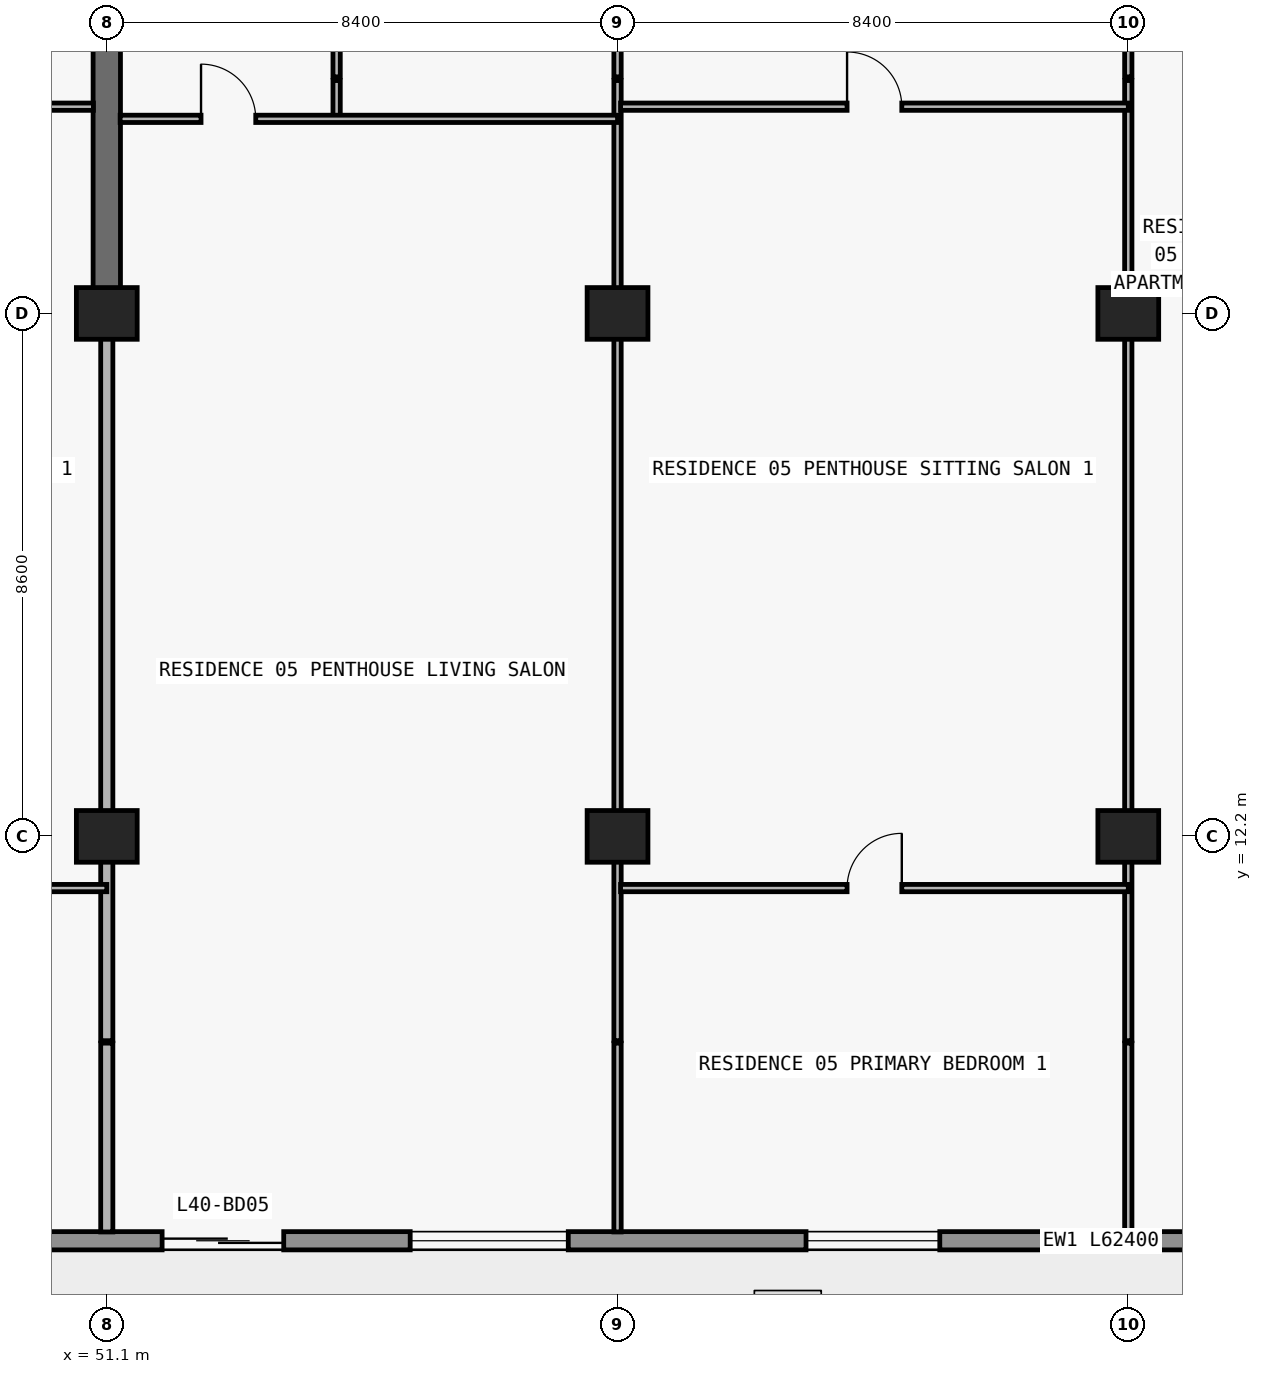
"""IFC4 building model, lengths in metres.
Left out: names, types, materials, properties, quantities, classifications, styles, units other than length and angle.
Written with IfcOpenShell. Run it as: python <this file> out.ifc"""

import sys

from ifc_helpers import new_model, si_unit, direction, frame, frame_2d, origin, origin_2d, place, context, subcontext, project, spatial, rectangle, extrude, element, fill, save


model = new_model("IFC4")
c1 = context("Model", 3, precision=1e-05, world=origin(), true_north=direction((0.0, 1.0)))
c2 = subcontext(c1, "Body", "Model", "MODEL_VIEW")
j1 = project(units=[si_unit("LENGTHUNIT", "METRE"), si_unit("PLANEANGLEUNIT", "RADIAN")], contexts=[c1])
p1 = place(None, origin())
s1 = spatial("IfcSite", under=j1, at=p1, CompositionType="ELEMENT")
p2 = place(p1, origin())
s2 = spatial("IfcBuilding", under=s1, at=p2, CompositionType="ELEMENT")
p3 = place(p2, frame((0.0, 0.0, 145.5)))
s3 = spatial("IfcBuildingStorey", under=s2, at=p3, CompositionType="ELEMENT", Elevation=145.5)
for number, where, z_axis, x_axis in (
    (1, (51.1, 12.2, 0.0), (0.0, 0.0, 1.0), (1.0, 0.0, 0.0)),
    (2, (59.5, 12.2, 0.0), (0.0, 0.0, 1.0), (1.0, 0.0, 0.0)),
    (3, (67.9, 12.2, 0.0), (0.0, 0.0, 1.0), (1.0, 0.0, 0.0)),
    (4, (51.1, 20.8, 0.0), (0.0, 0.0, 1.0), (1.0, 0.0, 0.0)),
    (5, (59.5, 20.8, 0.0), (0.0, 0.0, 1.0), (1.0, 0.0, 0.0)),
    (6, (67.9, 20.8, 0.0), (0.0, 0.0, 1.0), (1.0, 0.0, 0.0)),
):
    element("IfcColumn", number, at=place(p3, frame(where, z_axis=z_axis, x_axis=x_axis)), inside=s3, PredefinedType="COLUMN", context=c2, shape_type="SweptSolid", body=[
        extrude(rectangle(XDim=1.0, YDim=0.85, at=origin_2d()), origin(), (0.0, 0.0, 1.0), 3.05),
    ])
p4 = place(p3, frame((51.1, 20.8, 0.0), z_axis=(0.0, 0.0, 1.0), x_axis=(0.0, 1.0, 0.0)))
e7 = element("IfcWall", 7, at=p4, inside=s3, PredefinedType="SHEAR", context=c2, shape_type="SweptSolid", body=[
    extrude(rectangle(XDim=8.6, YDim=0.45, at=frame_2d((4.3, 0.0))), origin(), (0.0, 0.0, 1.0), 3.05),
])
p5 = place(p3, frame((70.1, 5.55, 0.0), z_axis=(0.0, 0.0, 1.0), x_axis=(-1.0, 0.0, 0.0)))
e8 = element("IfcWall", 8, at=p5, inside=s3, PredefinedType="STANDARD", context=c2, shape_type="SweptSolid", body=[
    extrude(rectangle(XDim=62.4, YDim=0.3, at=frame_2d((31.2, 0.0))), origin(), (0.0, 0.0, 1.0), 3.05),
])
p6 = place(p5, frame((57.226, 0.0, 0.0)))
e9 = element("IfcOpeningElement", 9, at=p6, cuts=e8, PredefinedType="OPENING", context=c2, shape_type="SweptSolid", body=[
    extrude(rectangle(XDim=2.0, YDim=2.3, at=frame_2d((1.0, 1.15))), frame((0.0, 0.16, 0.0), z_axis=(0.0, -1.0, 0.0), x_axis=(1.0, 0.0, 0.0)), (0.0, 0.0, 1.0), 0.32),
])
p7 = place(p5, frame((52.926, 0.0, 0.85)))
e10 = element("IfcOpeningElement", 10, at=p7, cuts=e8, PredefinedType="OPENING", context=c2, shape_type="SweptSolid", body=[
    extrude(rectangle(XDim=2.2, YDim=1.55, at=frame_2d((1.1, 0.775))), frame((0.0, 0.16, 0.0), z_axis=(0.0, -1.0, 0.0), x_axis=(1.0, 0.0, 0.0)), (0.0, 0.0, 1.0), 0.32),
])
p8 = place(p5, frame((48.49, 0.0, 0.0)))
e11 = element("IfcOpeningElement", 11, at=p8, cuts=e8, PredefinedType="OPENING", context=c2, shape_type="SweptSolid", body=[
    extrude(rectangle(XDim=2.0, YDim=2.3, at=frame_2d((1.0, 1.15))), frame((0.0, 0.16, 0.0), z_axis=(0.0, -1.0, 0.0), x_axis=(1.0, 0.0, 0.0)), (0.0, 0.0, 1.0), 0.32),
])
p9 = place(p5, frame((44.39, 0.0, 0.85)))
e12 = element("IfcOpeningElement", 12, at=p9, cuts=e8, PredefinedType="OPENING", context=c2, shape_type="SweptSolid", body=[
    extrude(rectangle(XDim=1.8, YDim=1.55, at=frame_2d((0.9, 0.775))), frame((0.0, 0.16, 0.0), z_axis=(0.0, -1.0, 0.0), x_axis=(1.0, 0.0, 0.0)), (0.0, 0.0, 1.0), 0.32),
])
p10 = place(p5, frame((40.426, 0.0, 0.0)))
e13 = element("IfcOpeningElement", 13, at=p10, cuts=e8, PredefinedType="OPENING", context=c2, shape_type="SweptSolid", body=[
    extrude(rectangle(XDim=2.0, YDim=2.3, at=frame_2d((1.0, 1.15))), frame((0.0, 0.16, 0.0), z_axis=(0.0, -1.0, 0.0), x_axis=(1.0, 0.0, 0.0)), (0.0, 0.0, 1.0), 0.32),
])
p11 = place(p5, frame((36.126, 0.0, 0.85)))
e14 = element("IfcOpeningElement", 14, at=p11, cuts=e8, PredefinedType="OPENING", context=c2, shape_type="SweptSolid", body=[
    extrude(rectangle(XDim=2.2, YDim=1.55, at=frame_2d((1.1, 0.775))), frame((0.0, 0.16, 0.0), z_axis=(0.0, -1.0, 0.0), x_axis=(1.0, 0.0, 0.0)), (0.0, 0.0, 1.0), 0.32),
])
p12 = place(p5, frame((32.09, 0.0, 0.0)))
e15 = element("IfcOpeningElement", 15, at=p12, cuts=e8, PredefinedType="OPENING", context=c2, shape_type="SweptSolid", body=[
    extrude(rectangle(XDim=2.0, YDim=2.3, at=frame_2d((1.0, 1.15))), frame((0.0, 0.16, 0.0), z_axis=(0.0, -1.0, 0.0), x_axis=(1.0, 0.0, 0.0)), (0.0, 0.0, 1.0), 0.32),
])
p13 = place(p5, frame((28.21, 0.0, 0.65)))
e16 = element("IfcOpeningElement", 16, at=p13, cuts=e8, PredefinedType="OPENING", context=c2, shape_type="SweptSolid", body=[
    extrude(rectangle(XDim=2.6, YDim=1.85, at=frame_2d((1.3, 0.925))), frame((0.0, 0.16, 0.0), z_axis=(0.0, -1.0, 0.0), x_axis=(1.0, 0.0, 0.0)), (0.0, 0.0, 1.0), 0.32),
])
p14 = place(p5, frame((22.1, 0.0, 0.85)))
e17 = element("IfcOpeningElement", 17, at=p14, cuts=e8, PredefinedType="OPENING", context=c2, shape_type="SweptSolid", body=[
    extrude(rectangle(XDim=2.2, YDim=1.55, at=frame_2d((1.1, 0.775))), frame((0.0, 0.16, 0.0), z_axis=(0.0, -1.0, 0.0), x_axis=(1.0, 0.0, 0.0)), (0.0, 0.0, 1.0), 0.32),
])
p15 = place(p5, frame((16.09, 0.0, 0.0)))
e18 = element("IfcOpeningElement", 18, at=p15, cuts=e8, PredefinedType="OPENING", context=c2, shape_type="SweptSolid", body=[
    extrude(rectangle(XDim=2.0, YDim=2.3, at=frame_2d((1.0, 1.15))), frame((0.0, 0.16, 0.0), z_axis=(0.0, -1.0, 0.0), x_axis=(1.0, 0.0, 0.0)), (0.0, 0.0, 1.0), 0.32),
])
p16 = place(p5, frame((11.41, 0.0, 0.65)))
e19 = element("IfcOpeningElement", 19, at=p16, cuts=e8, PredefinedType="OPENING", context=c2, shape_type="SweptSolid", body=[
    extrude(rectangle(XDim=2.6, YDim=1.85, at=frame_2d((1.3, 0.925))), frame((0.0, 0.16, 0.0), z_axis=(0.0, -1.0, 0.0), x_axis=(1.0, 0.0, 0.0)), (0.0, 0.0, 1.0), 0.32),
])
p17 = place(p5, frame((5.3, 0.0, 0.85)))
e20 = element("IfcOpeningElement", 20, at=p17, cuts=e8, PredefinedType="OPENING", context=c2, shape_type="SweptSolid", body=[
    extrude(rectangle(XDim=2.2, YDim=1.55, at=frame_2d((1.1, 0.775))), frame((0.0, 0.16, 0.0), z_axis=(0.0, -1.0, 0.0), x_axis=(1.0, 0.0, 0.0)), (0.0, 0.0, 1.0), 0.32),
])
p18 = place(p3, frame((51.1, 5.695, 0.0), z_axis=(0.0, 0.0, 1.0), x_axis=(0.0, 1.0, 0.0)))
e21 = element("IfcWall", 21, at=p18, inside=s3, PredefinedType="PARTITIONING", context=c2, shape_type="SweptSolid", body=[
    extrude(rectangle(XDim=3.105, YDim=0.2, at=frame_2d((1.552, 0.0))), origin(), (0.0, 0.0, 1.0), 3.05),
])
p19 = place(p3, frame((51.1, 8.84, 0.0), z_axis=(0.0, 0.0, 1.0), x_axis=(0.0, 1.0, 0.0)))
e22 = element("IfcWall", 22, at=p19, inside=s3, PredefinedType="PARTITIONING", context=c2, shape_type="SweptSolid", body=[
    extrude(rectangle(XDim=11.955, YDim=0.2, at=frame_2d((5.978, 0.0))), origin(), (0.0, 0.0, 1.0), 2.174),
])
p20 = place(p3, frame((54.88, 24.0, 0.0), z_axis=(0.0, 0.0, 1.0), x_axis=(0.0, 1.0, 0.0)))
e23 = element("IfcWall", 23, at=p20, inside=s3, PredefinedType="PARTITIONING", context=c2, shape_type="SweptSolid", body=[
    extrude(rectangle(XDim=0.63, YDim=0.12, at=frame_2d((0.315, 0.0))), origin(), (0.0, 0.0, 1.0), 3.05),
])
p21 = place(p3, frame((54.88, 24.69, 0.0), z_axis=(0.0, 0.0, 1.0), x_axis=(0.0, 1.0, 0.0)))
e24 = element("IfcWall", 24, at=p21, inside=s3, PredefinedType="PARTITIONING", context=c2, shape_type="SweptSolid", body=[
    extrude(rectangle(XDim=4.11, YDim=0.12, at=frame_2d((2.055, 0.0))), origin(), (0.0, 0.0, 1.0), 3.05),
])
p22 = place(p21, frame((1.605, 0.0, 0.0)))
e25 = element("IfcOpeningElement", 25, at=p22, cuts=e24, PredefinedType="OPENING", context=c2, shape_type="SweptSolid", body=[
    extrude(rectangle(XDim=0.9, YDim=2.15, at=frame_2d((0.45, 1.075))), frame((0.0, 0.07, 0.0), z_axis=(0.0, -1.0, 0.0), x_axis=(1.0, 0.0, 0.0)), (0.0, 0.0, 1.0), 0.14),
])
p23 = place(p3, frame((59.5, 5.695, 0.0), z_axis=(0.0, 0.0, 1.0), x_axis=(0.0, 1.0, 0.0)))
e26 = element("IfcWall", 26, at=p23, inside=s3, PredefinedType="PARTITIONING", context=c2, shape_type="SweptSolid", body=[
    extrude(rectangle(XDim=3.105, YDim=0.12, at=frame_2d((1.552, 0.0))), origin(), (0.0, 0.0, 1.0), 3.05),
])
p24 = place(p3, frame((59.5, 8.84, 0.0), z_axis=(0.0, 0.0, 1.0), x_axis=(0.0, 1.0, 0.0)))
e27 = element("IfcWall", 27, at=p24, inside=s3, PredefinedType="PARTITIONING", context=c2, shape_type="SweptSolid", body=[
    extrude(rectangle(XDim=15.79, YDim=0.12, at=frame_2d((7.895, 0.0))), origin(), (0.0, 0.0, 1.0), 2.174),
])
p25 = place(p3, frame((59.5, 24.69, 0.0), z_axis=(0.0, 0.0, 1.0), x_axis=(0.0, 1.0, 0.0)))
e28 = element("IfcWall", 28, at=p25, inside=s3, PredefinedType="PARTITIONING", context=c2, shape_type="SweptSolid", body=[
    extrude(rectangle(XDim=5.09, YDim=0.12, at=frame_2d((2.545, 0.0))), origin(), (0.0, 0.0, 1.0), 2.174),
])
p26 = place(p25, frame((1.505, 0.0, 0.0)))
e29 = element("IfcOpeningElement", 29, at=p26, cuts=e28, PredefinedType="OPENING", context=c2, shape_type="SweptSolid", body=[
    extrude(rectangle(XDim=0.9, YDim=2.124, at=frame_2d((0.45, 1.062))), frame((0.0, 0.07, 0.0), z_axis=(0.0, -1.0, 0.0), x_axis=(1.0, 0.0, 0.0)), (0.0, 0.0, 1.0), 0.14),
])
p27 = place(p3, frame((67.9, 5.695, 0.0), z_axis=(0.0, 0.0, 1.0), x_axis=(0.0, 1.0, 0.0)))
e30 = element("IfcWall", 30, at=p27, inside=s3, PredefinedType="PARTITIONING", context=c2, shape_type="SweptSolid", body=[
    extrude(rectangle(XDim=3.105, YDim=0.12, at=frame_2d((1.552, 0.0))), origin(), (0.0, 0.0, 1.0), 3.05),
])
p28 = place(p3, frame((67.9, 8.84, 0.0), z_axis=(0.0, 0.0, 1.0), x_axis=(0.0, 1.0, 0.0)))
e31 = element("IfcWall", 31, at=p28, inside=s3, PredefinedType="PARTITIONING", context=c2, shape_type="SweptSolid", body=[
    extrude(rectangle(XDim=15.79, YDim=0.12, at=frame_2d((7.895, 0.0))), origin(), (0.0, 0.0, 1.0), 2.174),
])
p29 = place(p3, frame((67.9, 24.69, 0.0), z_axis=(0.0, 0.0, 1.0), x_axis=(0.0, 1.0, 0.0)))
e32 = element("IfcWall", 32, at=p29, inside=s3, PredefinedType="PARTITIONING", context=c2, shape_type="SweptSolid", body=[
    extrude(rectangle(XDim=5.09, YDim=0.12, at=frame_2d((2.545, 0.0))), origin(), (0.0, 0.0, 1.0), 2.174),
])
p30 = place(p29, frame((1.505, 0.0, 0.0)))
e33 = element("IfcOpeningElement", 33, at=p30, cuts=e32, PredefinedType="OPENING", context=c2, shape_type="SweptSolid", body=[
    extrude(rectangle(XDim=0.9, YDim=2.124, at=frame_2d((0.45, 1.062))), frame((0.0, 0.07, 0.0), z_axis=(0.0, -1.0, 0.0), x_axis=(1.0, 0.0, 0.0)), (0.0, 0.0, 1.0), 0.14),
])
p31 = place(p3, frame((42.7, 11.35, 0.0), z_axis=(0.0, 0.0, 1.0), x_axis=(1.0, 0.0, 0.0)))
e34 = element("IfcWall", 34, at=p31, inside=s3, PredefinedType="PARTITIONING", context=c2, shape_type="SweptSolid", body=[
    extrude(rectangle(XDim=8.4, YDim=0.12, at=frame_2d((4.2, 0.0))), origin(), (0.0, 0.0, 1.0), 3.05),
])
p32 = place(p31, frame((3.75, 0.0, 0.0)))
e35 = element("IfcOpeningElement", 35, at=p32, cuts=e34, PredefinedType="OPENING", context=c2, shape_type="SweptSolid", body=[
    extrude(rectangle(XDim=0.9, YDim=2.15, at=frame_2d((0.45, 1.075))), frame((0.0, 0.07, 0.0), z_axis=(0.0, -1.0, 0.0), x_axis=(1.0, 0.0, 0.0)), (0.0, 0.0, 1.0), 0.14),
])
p33 = place(p3, frame((59.55, 11.35, 0.0), z_axis=(0.0, 0.0, 1.0), x_axis=(1.0, 0.0, 0.0)))
e36 = element("IfcWall", 36, at=p33, inside=s3, PredefinedType="PARTITIONING", context=c2, shape_type="SweptSolid", body=[
    extrude(rectangle(XDim=8.35, YDim=0.12, at=frame_2d((4.175, 0.0))), origin(), (0.0, 0.0, 1.0), 3.05),
])
p34 = place(p33, frame((3.725, 0.0, 0.0)))
e37 = element("IfcOpeningElement", 37, at=p34, cuts=e36, PredefinedType="OPENING", context=c2, shape_type="SweptSolid", body=[
    extrude(rectangle(XDim=0.9, YDim=2.15, at=frame_2d((0.45, 1.075))), frame((0.0, 0.07, 0.0), z_axis=(0.0, -1.0, 0.0), x_axis=(1.0, 0.0, 0.0)), (0.0, 0.0, 1.0), 0.14),
])
p35 = place(p3, frame((51.32, 24.0, 0.0), z_axis=(0.0, 0.0, 1.0), x_axis=(1.0, 0.0, 0.0)))
e38 = element("IfcWall", 38, at=p35, inside=s3, PredefinedType="PARTITIONING", context=c2, shape_type="SweptSolid", body=[
    extrude(rectangle(XDim=8.18, YDim=0.12, at=frame_2d((4.09, 0.0))), origin(), (0.0, 0.0, 1.0), 3.05),
])
p36 = place(p35, frame((1.33, 0.0, 0.0)))
e39 = element("IfcOpeningElement", 39, at=p36, cuts=e38, PredefinedType="OPENING", context=c2, shape_type="SweptSolid", body=[
    extrude(rectangle(XDim=0.9, YDim=2.15, at=frame_2d((0.45, 1.075))), frame((0.0, 0.07, 0.0), z_axis=(0.0, -1.0, 0.0), x_axis=(1.0, 0.0, 0.0)), (0.0, 0.0, 1.0), 0.14),
])
p37 = place(p3, frame((42.705, 24.2, 0.0), z_axis=(0.0, 0.0, 1.0), x_axis=(1.0, 0.0, 0.0)))
e40 = element("IfcWall", 40, at=p37, inside=s3, PredefinedType="PARTITIONING", context=c2, shape_type="SweptSolid", body=[
    extrude(rectangle(XDim=8.175, YDim=0.12, at=frame_2d((4.087, 0.0))), origin(), (0.0, 0.0, 1.0), 3.05),
])
p38 = place(p37, frame((3.637, 0.0, 0.0)))
e41 = element("IfcOpeningElement", 41, at=p38, cuts=e40, PredefinedType="OPENING", context=c2, shape_type="SweptSolid", body=[
    extrude(rectangle(XDim=0.9, YDim=2.15, at=frame_2d((0.45, 1.075))), frame((0.0, 0.07, 0.0), z_axis=(0.0, -1.0, 0.0), x_axis=(1.0, 0.0, 0.0)), (0.0, 0.0, 1.0), 0.14),
])
p39 = place(p3, frame((59.55, 24.2, 0.0), z_axis=(0.0, 0.0, 1.0), x_axis=(1.0, 0.0, 0.0)))
e42 = element("IfcWall", 42, at=p39, inside=s3, PredefinedType="PARTITIONING", context=c2, shape_type="SweptSolid", body=[
    extrude(rectangle(XDim=8.35, YDim=0.12, at=frame_2d((4.175, 0.0))), origin(), (0.0, 0.0, 1.0), 3.05),
])
p40 = place(p39, frame((3.725, 0.0, 0.0)))
e43 = element("IfcOpeningElement", 43, at=p40, cuts=e42, PredefinedType="OPENING", context=c2, shape_type="SweptSolid", body=[
    extrude(rectangle(XDim=0.9, YDim=2.15, at=frame_2d((0.45, 1.075))), frame((0.0, 0.07, 0.0), z_axis=(0.0, -1.0, 0.0), x_axis=(1.0, 0.0, 0.0)), (0.0, 0.0, 1.0), 0.14),
])
p41 = place(p15, origin())
e44 = element("IfcDoor", 44, at=p41, inside=s3, OperationType="DOUBLE_DOOR_SLIDING", PredefinedType="DOOR", context=c2, shape_type="SweptSolid", body=[
    extrude(rectangle(XDim=2.0, YDim=2.3, at=frame_2d((1.0, 1.15))), frame((0.0, 0.025, 0.0), z_axis=(0.0, -1.0, 0.0), x_axis=(1.0, 0.0, 0.0)), (0.0, 0.0, 1.0), 0.05),
])
fill(e18, e44)
p42 = place(p16, origin())
e45 = element("IfcWindow", 45, at=p42, inside=s3, PartitioningType="SINGLE_PANEL", PredefinedType="WINDOW", context=c2, shape_type="SweptSolid", body=[
    extrude(rectangle(XDim=2.6, YDim=1.85, at=frame_2d((1.3, 0.925))), frame((0.0, 0.03, 0.0), z_axis=(0.0, -1.0, 0.0), x_axis=(1.0, 0.0, 0.0)), (0.0, 0.0, 1.0), 0.06),
])
fill(e19, e45)
p43 = place(p17, origin())
e46 = element("IfcWindow", 46, at=p43, inside=s3, PartitioningType="SINGLE_PANEL", PredefinedType="WINDOW", context=c2, shape_type="SweptSolid", body=[
    extrude(rectangle(XDim=2.2, YDim=1.55, at=frame_2d((1.1, 0.775))), frame((0.0, 0.03, 0.0), z_axis=(0.0, -1.0, 0.0), x_axis=(1.0, 0.0, 0.0)), (0.0, 0.0, 1.0), 0.06),
])
fill(e20, e46)
p44 = place(p36, origin())
e47 = element("IfcDoor", 47, at=p44, inside=s3, OperationType="SINGLE_SWING_LEFT", PredefinedType="DOOR", context=c2, shape_type="SweptSolid", body=[
    extrude(rectangle(XDim=0.9, YDim=2.15, at=frame_2d((0.45, 1.075))), frame((0.0, 0.025, 0.0), z_axis=(0.0, -1.0, 0.0), x_axis=(1.0, 0.0, 0.0)), (0.0, 0.0, 1.0), 0.05),
])
fill(e39, e47)
p45 = place(p40, origin())
e48 = element("IfcDoor", 48, at=p45, inside=s3, OperationType="SINGLE_SWING_LEFT", PredefinedType="DOOR", context=c2, shape_type="SweptSolid", body=[
    extrude(rectangle(XDim=0.9, YDim=2.15, at=frame_2d((0.45, 1.075))), frame((0.0, 0.025, 0.0), z_axis=(0.0, -1.0, 0.0), x_axis=(1.0, 0.0, 0.0)), (0.0, 0.0, 1.0), 0.05),
])
fill(e43, e48)
p46 = place(p34, origin())
e49 = element("IfcDoor", 49, at=p46, inside=s3, OperationType="SINGLE_SWING_RIGHT", PredefinedType="DOOR", context=c2, shape_type="SweptSolid", body=[
    extrude(rectangle(XDim=0.9, YDim=2.15, at=frame_2d((0.45, 1.075))), frame((0.0, 0.025, 0.0), z_axis=(0.0, -1.0, 0.0), x_axis=(1.0, 0.0, 0.0)), (0.0, 0.0, 1.0), 0.05),
])
fill(e37, e49)
save(model, sys.argv[1])
